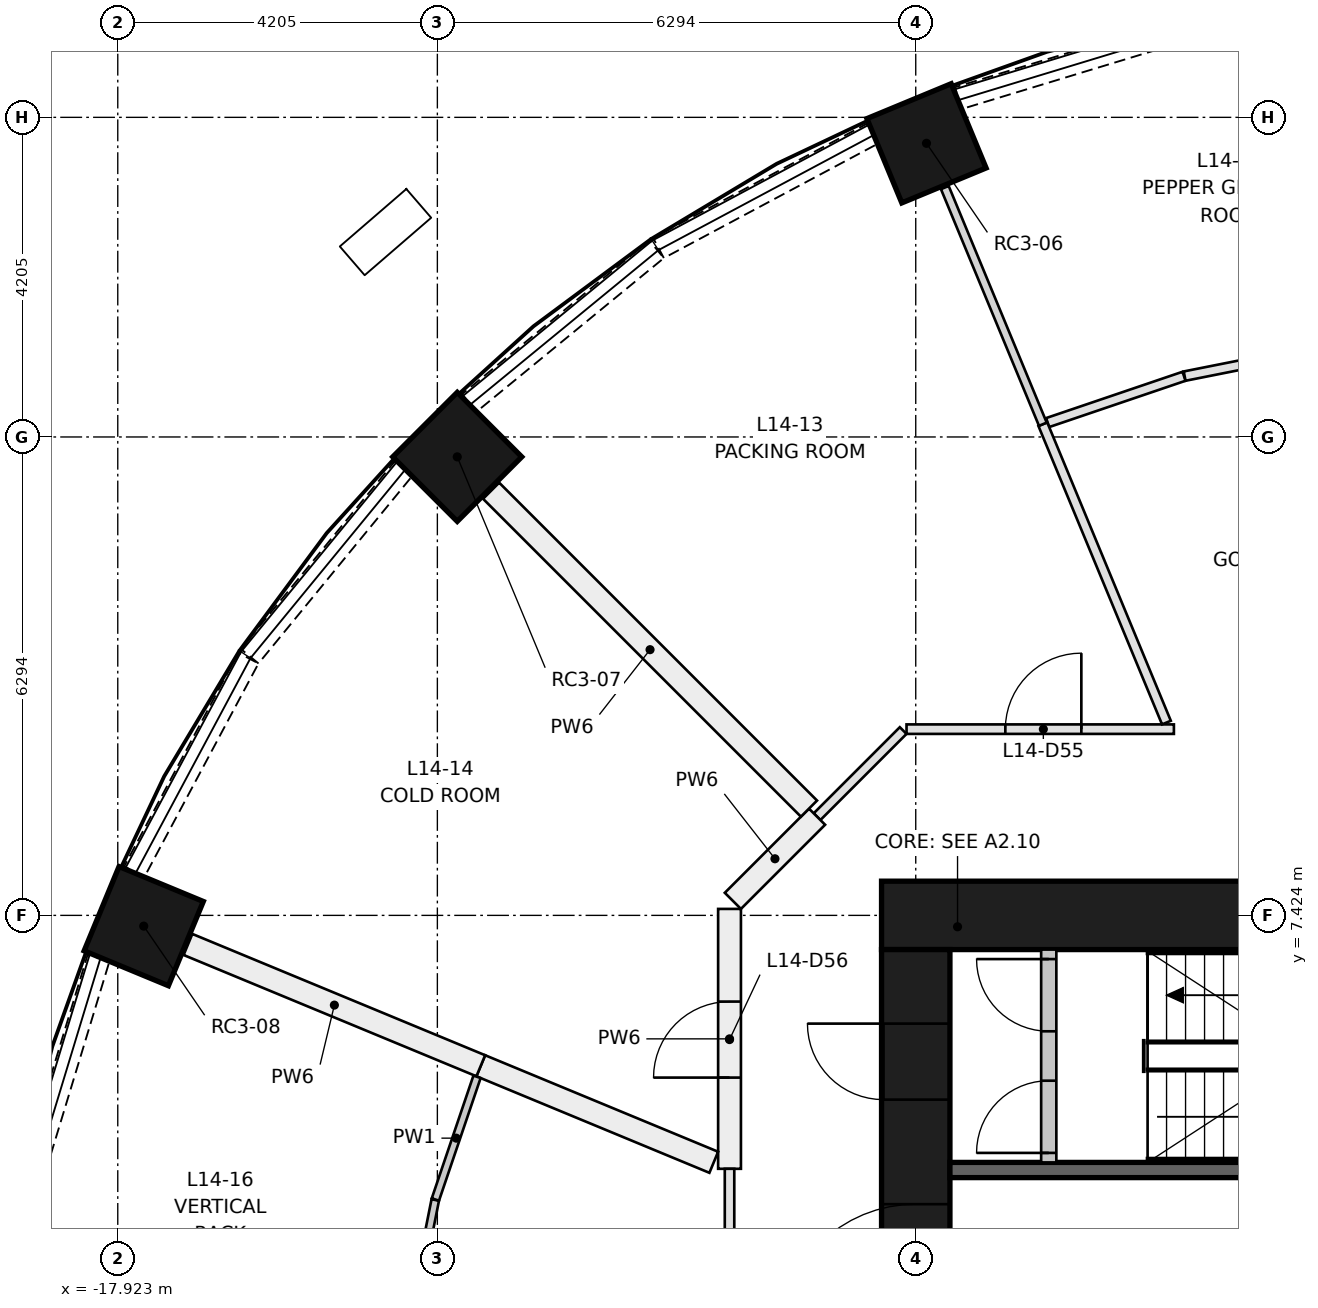
"""IFC4 building model, lengths in metres.
Left out: names, types, materials, properties, quantities, classifications, styles, units other than length and angle.
Written with IfcOpenShell. Run it as: python <this file> out.ifc"""

import sys

from ifc_helpers import new_model, si_unit, direction, frame, frame_2d, origin, origin_2d, place, context, subcontext, project, spatial, rectangle, extrude, element, fill, save


model = new_model("IFC4")
c1 = context("Model", 3, precision=1e-05, world=origin(), true_north=direction((0.0, 1.0)))
c2 = subcontext(c1, "Body", "Model", "MODEL_VIEW")
j1 = project(units=[si_unit("LENGTHUNIT", "METRE"), si_unit("PLANEANGLEUNIT", "RADIAN")], contexts=[c1])
p1 = place(None, origin())
s1 = spatial("IfcSite", under=j1, at=p1, CompositionType="ELEMENT")
p2 = place(p1, origin())
s2 = spatial("IfcBuilding", under=s1, at=p2, CompositionType="ELEMENT")
p3 = place(p2, frame((0.0, 0.0, 55.4)))
s3 = spatial("IfcBuildingStorey", under=s2, at=p3, CompositionType="ELEMENT", Elevation=55.4)
for number, where, z_axis, x_axis in (
    (1, (-7.282, 17.582, 0.0), (0.0, 0.0, 1.0), (-0.383, 0.924, 0.0)),
    (2, (-13.456, 13.456, 0.0), (0.0, 0.0, 1.0), (-0.707, 0.707, 0.0)),
    (3, (-17.582, 7.282, 0.0), (0.0, 0.0, 1.0), (-0.924, 0.383, 0.0)),
):
    element("IfcColumn", number, at=place(p3, frame(where, z_axis=z_axis, x_axis=x_axis)), inside=s3, PredefinedType="COLUMN", context=c2, shape_type="SweptSolid", body=[
        extrude(rectangle(XDim=1.2, YDim=1.2, at=origin_2d()), origin(), (0.0, 0.0, 1.0), 3.65),
    ])
p4 = place(p3, frame((-7.874, 7.424, 0.0), z_axis=(0.0, 0.0, 1.0), x_axis=(1.0, 0.0, 0.0)))
e4 = element("IfcWall", 4, at=p4, inside=s3, PredefinedType="SHEAR", context=c2, shape_type="SweptSolid", body=[
    extrude(rectangle(XDim=15.748, YDim=0.9, at=frame_2d((7.874, 0.0))), origin(), (0.0, 0.0, 1.0), 3.65),
])
p5 = place(p3, frame((-7.424, -6.974, 0.0), z_axis=(0.0, 0.0, 1.0), x_axis=(0.0, 1.0, 0.0)))
e5 = element("IfcWall", 5, at=p5, inside=s3, PredefinedType="SHEAR", context=c2, shape_type="SweptSolid", body=[
    extrude(rectangle(XDim=13.948, YDim=0.9, at=frame_2d((6.974, 0.0))), origin(), (0.0, 0.0, 1.0), 3.65),
])
p6 = place(p5, frame((6.474, 0.0, 0.0)))
e6 = element("IfcOpeningElement", 6, at=p6, cuts=e5, PredefinedType="OPENING", context=c2, shape_type="SweptSolid", body=[
    extrude(rectangle(XDim=1.0, YDim=2.1, at=frame_2d((0.5, 1.05))), frame((0.0, 0.46, 0.0), z_axis=(0.0, -1.0, 0.0), x_axis=(1.0, 0.0, 0.0)), (0.0, 0.0, 1.0), 0.92),
])
p7 = place(p5, frame((3.35, 0.0, 0.0)))
e7 = element("IfcOpeningElement", 7, at=p7, cuts=e5, PredefinedType="OPENING", context=c2, shape_type="SweptSolid", body=[
    extrude(rectangle(XDim=1.8, YDim=2.1, at=frame_2d((0.9, 1.05))), frame((0.0, 0.46, 0.0), z_axis=(0.0, -1.0, 0.0), x_axis=(1.0, 0.0, 0.0)), (0.0, 0.0, 1.0), 0.92),
])
p8 = place(p5, frame((8.799, 0.0, 0.0)))
e8 = element("IfcOpeningElement", 8, at=p8, cuts=e5, PredefinedType="OPENING", context=c2, shape_type="SweptSolid", body=[
    extrude(rectangle(XDim=1.8, YDim=2.1, at=frame_2d((0.9, 1.05))), frame((0.0, 0.46, 0.0), z_axis=(0.0, -1.0, 0.0), x_axis=(1.0, 0.0, 0.0)), (0.0, 0.0, 1.0), 0.92),
])
p9 = place(p5, frame((11.974, 0.0, 0.0)))
e9 = element("IfcOpeningElement", 9, at=p9, cuts=e5, PredefinedType="OPENING", context=c2, shape_type="SweptSolid", body=[
    extrude(rectangle(XDim=1.0, YDim=2.1, at=frame_2d((0.5, 1.05))), frame((0.0, 0.46, 0.0), z_axis=(0.0, -1.0, 0.0), x_axis=(1.0, 0.0, 0.0)), (0.0, 0.0, 1.0), 0.92),
])
p10 = place(p3, frame((-6.974, 4.074, 0.0), z_axis=(0.0, 0.0, 1.0), x_axis=(1.0, 0.0, 0.0)))
e10 = element("IfcWall", 10, at=p10, inside=s3, PredefinedType="SHEAR", context=c2, shape_type="SweptSolid", body=[
    extrude(rectangle(XDim=6.974, YDim=0.2, at=frame_2d((3.487, 0.0))), origin(), (0.0, 0.0, 1.0), 3.3),
])
p11 = place(p3, frame((-5.674, 4.174, 0.0), z_axis=(0.0, 0.0, 1.0), x_axis=(0.0, 1.0, 0.0)))
e11 = element("IfcWall", 11, at=p11, inside=s3, PredefinedType="PARTITIONING", context=c2, shape_type="SweptSolid", body=[
    extrude(rectangle(XDim=2.8, YDim=0.2, at=frame_2d((1.4, 0.0))), origin(), (0.0, 0.0, 1.0), 3.3),
])
p12 = place(p11, frame((0.125, 0.0, 0.0)))
e12 = element("IfcOpeningElement", 12, at=p12, cuts=e11, PredefinedType="OPENING", context=c2, shape_type="SweptSolid", body=[
    extrude(rectangle(XDim=0.95, YDim=2.1, at=frame_2d((0.475, 1.05))), frame((0.0, 0.11, 0.0), z_axis=(0.0, -1.0, 0.0), x_axis=(1.0, 0.0, 0.0)), (0.0, 0.0, 1.0), 0.22),
])
p13 = place(p11, frame((1.725, 0.0, 0.0)))
e13 = element("IfcOpeningElement", 13, at=p13, cuts=e11, PredefinedType="OPENING", context=c2, shape_type="SweptSolid", body=[
    extrude(rectangle(XDim=0.95, YDim=2.1, at=frame_2d((0.475, 1.05))), frame((0.0, 0.11, 0.0), z_axis=(0.0, -1.0, 0.0), x_axis=(1.0, 0.0, 0.0)), (0.0, 0.0, 1.0), 0.22),
])
p14 = place(p3, frame((-3.814, 19.102, 0.0), z_axis=(0.0, 0.0, 1.0), x_axis=(-0.956849017819, -0.290585541792, 0.0)))
e14 = element("IfcWall", 14, at=p14, inside=s3, PredefinedType="SOLIDWALL", context=c2, shape_type="SweptSolid", body=[
    extrude(rectangle(XDim=3.188, YDim=0.3, at=frame_2d((1.594, 0.0))), origin(), (0.0, 0.0, 1.0), 0.9),
])
p15 = place(p3, frame((-7.998, 17.706, 0.0), z_axis=(0.0, 0.0, 1.0), x_axis=(-0.881994263934, -0.471260138764, 0.0)))
e15 = element("IfcWall", 15, at=p15, inside=s3, PredefinedType="SOLIDWALL", context=c2, shape_type="SweptSolid", body=[
    extrude(rectangle(XDim=3.187, YDim=0.3, at=frame_2d((1.593, 0.0))), origin(), (0.0, 0.0, 1.0), 0.9),
])
for number, where, z_axis, x_axis in (
    (16, (-10.833, 16.188, 0.0), (0.0, 0.0, 1.0), (-0.773, -0.634, 0.0)),
    (17, (-14.166, 13.298, 0.0), (0.0, 0.0, 1.0), (-0.634, -0.773, 0.0)),
):
    element("IfcWall", number, at=place(p3, frame(where, z_axis=z_axis, x_axis=x_axis)), inside=s3, PredefinedType="SOLIDWALL", context=c2, shape_type="SweptSolid", body=[
        extrude(rectangle(XDim=3.188, YDim=0.3, at=frame_2d((1.594, 0.0))), origin(), (0.0, 0.0, 1.0), 0.9),
    ])
p16 = place(p3, frame((-16.204, 10.809, 0.0), z_axis=(0.0, 0.0, 1.0), x_axis=(-0.471260138764, -0.881994263934, 0.0)))
e18 = element("IfcWall", 18, at=p16, inside=s3, PredefinedType="SOLIDWALL", context=c2, shape_type="SweptSolid", body=[
    extrude(rectangle(XDim=3.187, YDim=0.3, at=frame_2d((1.593, 0.0))), origin(), (0.0, 0.0, 1.0), 0.9),
])
p17 = place(p3, frame((-18.175, 6.865, 0.0), z_axis=(0.0, 0.0, 1.0), x_axis=(-0.290585541792, -0.956849017819, 0.0)))
e19 = element("IfcWall", 19, at=p17, inside=s3, PredefinedType="SOLIDWALL", context=c2, shape_type="SweptSolid", body=[
    extrude(rectangle(XDim=3.188, YDim=0.3, at=frame_2d((1.594, 0.0))), origin(), (0.0, 0.0, 1.0), 0.9),
])
p18 = place(p3, frame((-8.722, 8.722, 0.0), z_axis=(0.0, 0.0, 1.0), x_axis=(0.707030604857, 0.70718294931, 0.0)))
e20 = element("IfcWall", 20, at=p18, inside=s3, PredefinedType="PARTITIONING", context=c2, shape_type="SweptSolid", body=[
    extrude(rectangle(XDim=1.603, YDim=0.125, at=frame_2d((0.801, 0.0))), origin(), (0.0, 0.0, 1.0), 3.3),
])
p19 = place(p3, frame((-7.545, 9.874, 0.0), z_axis=(0.0, 0.0, 1.0), x_axis=(1.0, 0.0, 0.0)))
e21 = element("IfcWall", 21, at=p19, inside=s3, PredefinedType="PARTITIONING", context=c2, shape_type="SweptSolid", body=[
    extrude(rectangle(XDim=3.518, YDim=0.125, at=frame_2d((1.759, 0.0))), origin(), (0.0, 0.0, 1.0), 3.3),
])
p20 = place(p19, frame((1.3, 0.0, 0.0)))
e22 = element("IfcOpeningElement", 22, at=p20, cuts=e21, PredefinedType="OPENING", context=c2, shape_type="SweptSolid", body=[
    extrude(rectangle(XDim=1.0, YDim=2.1, at=frame_2d((0.5, 1.05))), frame((0.0, 0.073, 0.0), z_axis=(0.0, -1.0, 0.0), x_axis=(1.0, 0.0, 0.0)), (0.0, 0.0, 1.0), 0.145),
])
p21 = place(p3, frame((-9.874, 4.09, 0.0), z_axis=(0.0, 0.0, 1.0), x_axis=(0.0, 1.0, 0.0)))
e23 = element("IfcWall", 23, at=p21, inside=s3, PredefinedType="PARTITIONING", context=c2, shape_type="SweptSolid", body=[
    extrude(rectangle(XDim=3.419, YDim=0.3, at=frame_2d((1.709, 0.0))), origin(), (0.0, 0.0, 1.0), 3.3),
])
p22 = place(p21, frame((1.2, 0.0, 0.0)))
e24 = element("IfcOpeningElement", 24, at=p22, cuts=e23, PredefinedType="OPENING", context=c2, shape_type="SweptSolid", body=[
    extrude(rectangle(XDim=1.0, YDim=2.1, at=frame_2d((0.5, 1.05))), frame((0.0, 0.16, 0.0), z_axis=(0.0, -1.0, 0.0), x_axis=(1.0, 0.0, 0.0)), (0.0, 0.0, 1.0), 0.32),
])
p23 = place(p3, frame((-9.83, 7.615, 0.0), z_axis=(0.0, 0.0, 1.0), x_axis=(0.70718471217, 0.707028841614, 0.0)))
e25 = element("IfcWall", 25, at=p23, inside=s3, PredefinedType="PARTITIONING", context=c2, shape_type="SweptSolid", body=[
    extrude(rectangle(XDim=1.566, YDim=0.3, at=frame_2d((0.783, 0.0))), origin(), (0.0, 0.0, 1.0), 3.3),
])
p24 = place(p3, frame((-9.874, 0.0, 0.0), z_axis=(0.0, 0.0, 1.0), x_axis=(0.0, 1.0, 0.0)))
e26 = element("IfcWall", 26, at=p24, inside=s3, PredefinedType="PARTITIONING", context=c2, shape_type="SweptSolid", body=[
    extrude(rectangle(XDim=4.09, YDim=0.125, at=frame_2d((2.045, 0.0))), origin(), (0.0, 0.0, 1.0), 3.3),
])
p25 = place(p24, frame((1.5, 0.0, 0.0)))
e27 = element("IfcOpeningElement", 27, at=p25, cuts=e26, PredefinedType="OPENING", context=c2, shape_type="SweptSolid", body=[
    extrude(rectangle(XDim=1.0, YDim=2.1, at=frame_2d((0.5, 1.05))), frame((0.0, 0.073, 0.0), z_axis=(0.0, -1.0, 0.0), x_axis=(1.0, 0.0, 0.0)), (0.0, 0.0, 1.0), 0.145),
])
p26 = place(p3, frame((-5.688, 13.907, 0.0), z_axis=(0.0, 0.0, 1.0), x_axis=(0.946929690395, 0.321440758848, 0.0)))
e28 = element("IfcWall", 28, at=p26, inside=s3, PredefinedType="PARTITIONING", context=c2, shape_type="SweptSolid", body=[
    extrude(rectangle(XDim=1.895, YDim=0.125, at=frame_2d((0.948, 0.0))), origin(), (0.0, 0.0, 1.0), 3.3),
])
p27 = place(p3, frame((-3.886, 14.519, 0.0), z_axis=(0.0, 0.0, 1.0), x_axis=(0.980795915473, 0.19503684829, 0.0)))
e29 = element("IfcWall", 29, at=p27, inside=s3, PredefinedType="PARTITIONING", context=c2, shape_type="SweptSolid", body=[
    extrude(rectangle(XDim=1.958, YDim=0.125, at=frame_2d((0.979, 0.0))), origin(), (0.0, 0.0, 1.0), 3.3),
])
p28 = place(p3, frame((-4.126, 9.96, 0.0), z_axis=(0.0, 0.0, 1.0), x_axis=(-0.382676572561, 0.923882373905, 0.0)))
e30 = element("IfcWall", 30, at=p28, inside=s3, PredefinedType="PARTITIONING", context=c2, shape_type="SweptSolid", body=[
    extrude(rectangle(XDim=4.249, YDim=0.125, at=frame_2d((2.125, 0.0))), origin(), (0.0, 0.0, 1.0), 3.3),
])
p29 = place(p3, frame((-5.752, 13.886, 0.0), z_axis=(0.0, 0.0, 1.0), x_axis=(-0.382716478617, 0.923865843613, 0.0)))
e31 = element("IfcWall", 31, at=p29, inside=s3, PredefinedType="PARTITIONING", context=c2, shape_type="SweptSolid", body=[
    extrude(rectangle(XDim=3.37, YDim=0.11, at=frame_2d((1.685, 0.0))), origin(), (0.0, 0.0, 1.0), 3.3),
])
p30 = place(p3, frame((-8.829, 8.829, 0.0), z_axis=(0.0, 0.0, 1.0), x_axis=(-0.707106781187, 0.707106781187, 0.0)))
e32 = element("IfcWall", 32, at=p30, inside=s3, PredefinedType="PARTITIONING", context=c2, shape_type="SweptSolid", body=[
    extrude(rectangle(XDim=5.914, YDim=0.3, at=frame_2d((2.957, 0.0))), origin(), (0.0, 0.0, 1.0), 3.3),
])
p31 = place(p3, frame((-10.081, 4.176, 0.0), z_axis=(0.0, 0.0, 1.0), x_axis=(-0.923876033225, 0.382691880281, 0.0)))
e33 = element("IfcWall", 33, at=p31, inside=s3, PredefinedType="PARTITIONING", context=c2, shape_type="SweptSolid", body=[
    extrude(rectangle(XDim=3.318, YDim=0.3, at=frame_2d((1.659, 0.0))), origin(), (0.0, 0.0, 1.0), 3.3),
])
p32 = place(p3, frame((-13.147, 5.446, 0.0), z_axis=(0.0, 0.0, 1.0), x_axis=(-0.923873410436, 0.382698212028, 0.0)))
e34 = element("IfcWall", 34, at=p32, inside=s3, PredefinedType="PARTITIONING", context=c2, shape_type="SweptSolid", body=[
    extrude(rectangle(XDim=4.17, YDim=0.3, at=frame_2d((2.085, 0.0))), origin(), (0.0, 0.0, 1.0), 3.3),
])
p33 = place(p3, frame((-14.108, 1.861, 0.0), z_axis=(0.0, 0.0, 1.0), x_axis=(0.195204777565, 0.980762506836, 0.0)))
e35 = element("IfcWall", 35, at=p33, inside=s3, PredefinedType="PARTITIONING", context=c2, shape_type="SweptSolid", body=[
    extrude(rectangle(XDim=1.855, YDim=0.1, at=frame_2d((0.927, 0.0))), origin(), (0.0, 0.0, 1.0), 3.3),
])
p34 = place(p3, frame((-13.744, 3.686, 0.0), z_axis=(0.0, 0.0, 1.0), x_axis=(0.321250473512, 0.946994262532, 0.0)))
e36 = element("IfcWall", 36, at=p34, inside=s3, PredefinedType="PARTITIONING", context=c2, shape_type="SweptSolid", body=[
    extrude(rectangle(XDim=1.705, YDim=0.1, at=frame_2d((0.852, 0.0))), origin(), (0.0, 0.0, 1.0), 3.3),
])
p35 = place(p12, origin())
e37 = element("IfcDoor", 37, at=p35, inside=s3, OperationType="SINGLE_SWING_LEFT", PredefinedType="DOOR", context=c2, shape_type="SweptSolid", body=[
    extrude(rectangle(XDim=0.95, YDim=2.1, at=frame_2d((0.475, 1.05))), frame((0.0, 0.025, 0.0), z_axis=(0.0, -1.0, 0.0), x_axis=(1.0, 0.0, 0.0)), (0.0, 0.0, 1.0), 0.05),
])
fill(e12, e37)
p36 = place(p13, origin())
e38 = element("IfcDoor", 38, at=p36, inside=s3, OperationType="SINGLE_SWING_RIGHT", PredefinedType="DOOR", context=c2, shape_type="SweptSolid", body=[
    extrude(rectangle(XDim=0.95, YDim=2.1, at=frame_2d((0.475, 1.05))), frame((0.0, 0.025, 0.0), z_axis=(0.0, -1.0, 0.0), x_axis=(1.0, 0.0, 0.0)), (0.0, 0.0, 1.0), 0.05),
])
fill(e13, e38)
p37 = place(p8, origin())
e39 = element("IfcDoor", 39, at=p37, inside=s3, OperationType="DOUBLE_DOOR_SINGLE_SWING", PredefinedType="DOOR", context=c2, shape_type="SweptSolid", body=[
    extrude(rectangle(XDim=1.8, YDim=2.1, at=frame_2d((0.9, 1.05))), frame((0.0, 0.025, 0.0), z_axis=(0.0, -1.0, 0.0), x_axis=(1.0, 0.0, 0.0)), (0.0, 0.0, 1.0), 0.05),
])
fill(e8, e39)
p38 = place(p9, origin())
e40 = element("IfcDoor", 40, at=p38, inside=s3, OperationType="SINGLE_SWING_RIGHT", PredefinedType="DOOR", context=c2, shape_type="SweptSolid", body=[
    extrude(rectangle(XDim=1.0, YDim=2.1, at=frame_2d((0.5, 1.05))), frame((0.0, 0.45, 0.0), z_axis=(0.0, -1.0, 0.0), x_axis=(1.0, 0.0, 0.0)), (0.0, 0.0, 1.0), 0.05),
])
fill(e9, e40)
p39 = place(p20, origin())
e41 = element("IfcDoor", 41, at=p39, inside=s3, OperationType="SINGLE_SWING_RIGHT", PredefinedType="DOOR", context=c2, shape_type="SweptSolid", body=[
    extrude(rectangle(XDim=1.0, YDim=2.1, at=frame_2d((0.5, 1.05))), frame((0.0, 0.025, 0.0), z_axis=(0.0, -1.0, 0.0), x_axis=(1.0, 0.0, 0.0)), (0.0, 0.0, 1.0), 0.05),
])
fill(e22, e41)
p40 = place(p22, origin())
e42 = element("IfcDoor", 42, at=p40, inside=s3, OperationType="SINGLE_SWING_LEFT", PredefinedType="DOOR", context=c2, shape_type="SweptSolid", body=[
    extrude(rectangle(XDim=1.0, YDim=2.1, at=frame_2d((0.5, 1.05))), frame((0.0, 0.025, 0.0), z_axis=(0.0, -1.0, 0.0), x_axis=(1.0, 0.0, 0.0)), (0.0, 0.0, 1.0), 0.05),
])
fill(e24, e42)
save(model, sys.argv[1])
